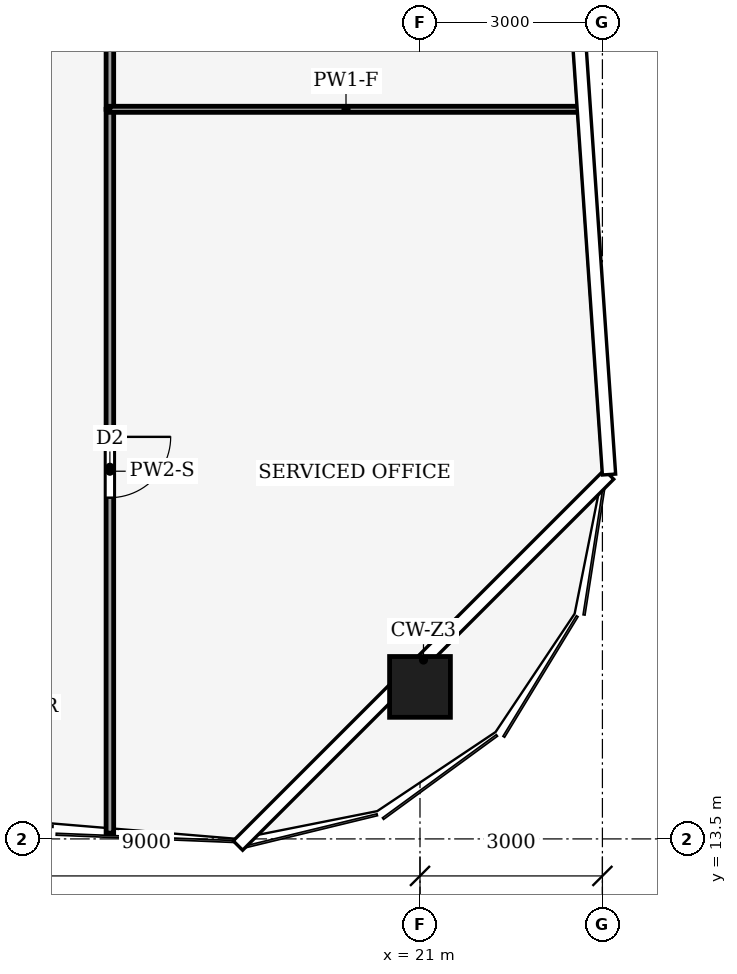
"""IFC4 building model, lengths in metres.
Left out: names, types, materials, properties, quantities, classifications, styles, units other than length and angle.
Written with IfcOpenShell. Run it as: python <this file> out.ifc"""

import sys

from ifc_helpers import new_model, si_unit, direction, frame, frame_2d, origin, origin_2d, place, context, subcontext, project, spatial, rectangle, hollow_rectangle, extrude, element, fill, save


model = new_model("IFC4")
c1 = context("Model", 3, precision=1e-05, world=origin(), true_north=direction((0.0, 1.0)))
c2 = subcontext(c1, "Body", "Model", "MODEL_VIEW")
j1 = project(units=[si_unit("LENGTHUNIT", "METRE"), si_unit("PLANEANGLEUNIT", "RADIAN")], contexts=[c1])
p1 = place(None, origin())
s1 = spatial("IfcSite", under=j1, at=p1, CompositionType="ELEMENT")
p2 = place(p1, origin())
s2 = spatial("IfcBuilding", under=s1, at=p2, CompositionType="ELEMENT")
p3 = place(p2, frame((0.0, 0.0, 214.0)))
s3 = spatial("IfcBuildingStorey", under=s2, at=p3, CompositionType="ELEMENT", Elevation=214.0)
p4 = place(p3, frame((21.0, 16.0, 0.0), z_axis=(0.0, 0.0, 1.0), x_axis=(1.0, 0.0, 0.0)))
e1 = element("IfcColumn", 1, at=p4, inside=s3, PredefinedType="COLUMN", context=c2, shape_type="SweptSolid", body=[
    extrude(hollow_rectangle(XDim=1.0, YDim=1.0, WallThickness=0.06, at=origin_2d()), origin(), (0.0, 0.0, 1.0), 4.0),
])
p5 = place(p3, frame((15.9, 25.5, 0.0), z_axis=(0.0, 0.0, 1.0), x_axis=(0.0, -1.0, 0.0)))
e2 = element("IfcWall", 2, at=p5, inside=s3, PredefinedType="PARTITIONING", context=c2, shape_type="SweptSolid", body=[
    extrude(rectangle(XDim=11.905, YDim=0.125, at=frame_2d((5.953, 0.0))), origin(), (0.0, 0.0, 1.0), 3.04),
])
p6 = place(p5, frame((5.387, 0.0, 0.0)))
e3 = element("IfcOpeningElement", 3, at=p6, cuts=e2, PredefinedType="OPENING", context=c2, shape_type="SweptSolid", body=[
    extrude(rectangle(XDim=1.0, YDim=2.1, at=frame_2d((0.5, 1.05))), frame((0.0, 0.073, 0.0), z_axis=(0.0, -1.0, 0.0), x_axis=(1.0, 0.0, 0.0)), (0.0, 0.0, 1.0), 0.145),
])
p7 = place(p3, frame((15.9, 28.5, 0.0), z_axis=(0.0, 0.0, 1.0), x_axis=(0.0, -1.0, 0.0)))
e4 = element("IfcWall", 4, at=p7, inside=s3, PredefinedType="PARTITIONING", context=c2, shape_type="SweptSolid", body=[
    extrude(rectangle(XDim=3.0, YDim=0.125, at=frame_2d((1.5, 0.0))), origin(), (0.0, 0.0, 1.0), 3.87),
])
p8 = place(p7, frame((1.0, 0.0, 0.0)))
e5 = element("IfcOpeningElement", 5, at=p8, cuts=e4, PredefinedType="OPENING", context=c2, shape_type="SweptSolid", body=[
    extrude(rectangle(XDim=1.0, YDim=2.1, at=frame_2d((0.5, 1.05))), frame((0.0, 0.073, 0.0), z_axis=(0.0, -1.0, 0.0), x_axis=(1.0, 0.0, 0.0)), (0.0, 0.0, 1.0), 0.145),
])
p9 = place(p3, frame((23.666, 25.5, 0.0), z_axis=(0.0, 0.0, 1.0), x_axis=(-1.0, 0.0, 0.0)))
e6 = element("IfcWall", 6, at=p9, inside=s3, PredefinedType="PARTITIONING", context=c2, shape_type="SweptSolid", body=[
    extrude(rectangle(XDim=7.766, YDim=0.1, at=frame_2d((3.883, 0.0))), origin(), (0.0, 0.0, 1.0), 3.04),
])
p10 = place(p6, origin())
e7 = element("IfcDoor", 7, at=p10, inside=s3, OperationType="SINGLE_SWING_LEFT", PredefinedType="DOOR", context=c2, shape_type="SweptSolid", body=[
    extrude(rectangle(XDim=1.0, YDim=2.1, at=frame_2d((0.5, 1.05))), frame((0.0, 0.025, 0.0), z_axis=(0.0, -1.0, 0.0), x_axis=(1.0, 0.0, 0.0)), (0.0, 0.0, 1.0), 0.05),
])
fill(e3, e7)
save(model, sys.argv[1])
